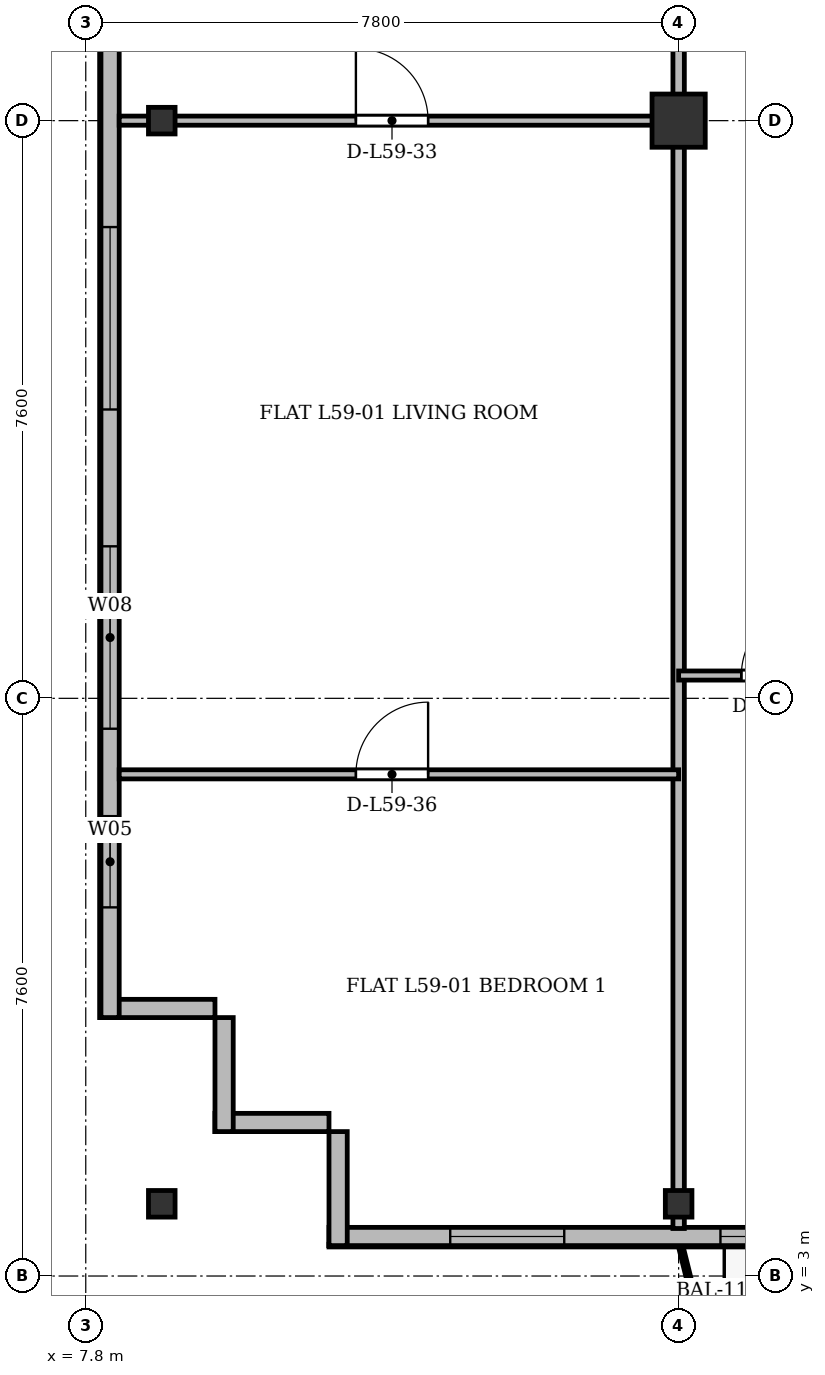
"""IFC4 building model, lengths in metres.
Left out: names, types, materials, properties, quantities, classifications, styles, units other than length and angle.
Written with IfcOpenShell. Run it as: python <this file> out.ifc"""

import sys

from ifc_helpers import new_model, si_unit, direction, frame, frame_2d, origin, origin_2d, place, context, subcontext, project, spatial, rectangle, i_section, extrude, source, transform, mapped, element, fill, save


model = new_model("IFC4")
c1 = context("Model", 3, precision=1e-05, world=origin(), true_north=direction((0.0, 1.0)))
c2 = subcontext(c1, "Body", "Model", "MODEL_VIEW")
j1 = project(units=[si_unit("LENGTHUNIT", "METRE"), si_unit("PLANEANGLEUNIT", "RADIAN")], contexts=[c1])
p1 = place(None, origin())
s1 = spatial("IfcSite", under=j1, at=p1, CompositionType="ELEMENT")
p2 = place(p1, origin())
s2 = spatial("IfcBuilding", under=s1, at=p2, CompositionType="ELEMENT")
p3 = place(p2, frame((0.0, 0.0, 226.5)))
s3 = spatial("IfcBuildingStorey", under=s2, at=p3, CompositionType="ELEMENT", Elevation=226.5)
m1 = source(origin(), c2, "Body", "SweptSolid", [
    extrude(i_section(OverallWidth=0.35, OverallDepth=0.35, WebThickness=0.018, FlangeThickness=0.028, at=origin_2d()), origin(), (0.0, 0.0, 1.0), 3.6),
])
for number, where, z_axis, x_axis in (
    (1, (8.8, 3.95, 0.0), (0.0, 0.0, 1.0), (1.0, 0.0, 0.0)),
    (2, (8.8, 18.2, 0.0), (0.0, 0.0, 1.0), (1.0, 0.0, 0.0)),
    (3, (15.6, 3.95, 0.0), (0.0, 0.0, 1.0), (1.0, 0.0, 0.0)),
):
    element("IfcColumn", number, at=place(p3, frame(where, z_axis=z_axis, x_axis=x_axis)), inside=s3, PredefinedType="COLUMN", context=c2, shape_type="MappedRepresentation", body=[
        mapped(m1, transform((0.0, 0.0, 0.0), x_axis=(1.0, 0.0, 0.0), y_axis=(0.0, 1.0, 0.0), z_axis=(0.0, 0.0, 1.0), scale=1.0)),
    ])
m2 = source(origin(), c2, "Body", "SweptSolid", [
    extrude(rectangle(XDim=0.7, YDim=0.7, at=origin_2d()), origin(), (0.0, 0.0, 1.0), 3.6),
])
p4 = place(p3, frame((15.6, 18.2, 0.0), z_axis=(0.0, 0.0, 1.0), x_axis=(1.0, 0.0, 0.0)))
e4 = element("IfcColumn", 4, at=p4, inside=s3, PredefinedType="COLUMN", context=c2, shape_type="MappedRepresentation", body=[
    mapped(m2, transform((0.0, 0.0, 0.0), x_axis=(1.0, 0.0, 0.0), y_axis=(0.0, 1.0, 0.0), z_axis=(0.0, 0.0, 1.0), scale=1.0)),
])
for number, where, z_axis, x_axis in (
    (5, (11.0, 5.02, 0.0), (0.0, 0.0, 1.0), (-1.0, 0.0, 0.0)),
    (6, (9.62, 4.9, 0.0), (0.0, 0.0, 1.0), (0.0, 1.0, 0.0)),
):
    element("IfcWall", number, at=place(p3, frame(where, z_axis=z_axis, x_axis=x_axis)), inside=s3, PredefinedType="SOLIDWALL", context=c2, shape_type="SweptSolid", body=[
        extrude(rectangle(XDim=1.5, YDim=0.24, at=frame_2d((0.75, 0.0))), origin(), (0.0, 0.0, 1.0), 3.36),
    ])
p5 = place(p3, frame((9.5, 6.52, 0.0), z_axis=(0.0, 0.0, 1.0), x_axis=(-1.0, 0.0, 0.0)))
e7 = element("IfcWall", 7, at=p5, inside=s3, PredefinedType="SOLIDWALL", context=c2, shape_type="SweptSolid", body=[
    extrude(rectangle(XDim=1.5, YDim=0.24, at=frame_2d((0.75, 0.0))), origin(), (0.0, 0.0, 1.0), 2.86),
])
p6 = place(p3, frame((8.12, 6.4, 0.0), z_axis=(0.0, 0.0, 1.0), x_axis=(0.0, 1.0, 0.0)))
e8 = element("IfcWall", 8, at=p6, inside=s3, PredefinedType="SOLIDWALL", context=c2, shape_type="SweptSolid", body=[
    extrude(rectangle(XDim=39.1, YDim=0.24, at=frame_2d((19.55, 0.0))), origin(), (0.0, 0.0, 1.0), 3.36),
])
p7 = place(p6, frame((1.45, 0.0, 0.92)))
e9 = element("IfcOpeningElement", 9, at=p7, cuts=e8, PredefinedType="OPENING", context=c2, shape_type="SweptSolid", body=[
    extrude(rectangle(XDim=1.2, YDim=1.65, at=frame_2d((0.6, 0.825))), frame((0.0, 0.13, 0.0), z_axis=(0.0, -1.0, 0.0), x_axis=(1.0, 0.0, 0.0)), (0.0, 0.0, 1.0), 0.26),
])
p8 = place(p6, frame((3.8, 0.0, 0.92)))
e10 = element("IfcOpeningElement", 10, at=p8, cuts=e8, PredefinedType="OPENING", context=c2, shape_type="SweptSolid", body=[
    extrude(rectangle(XDim=2.4, YDim=2.1, at=frame_2d((1.2, 1.05))), frame((0.0, 0.13, 0.0), z_axis=(0.0, -1.0, 0.0), x_axis=(1.0, 0.0, 0.0)), (0.0, 0.0, 1.0), 0.26),
])
p9 = place(p6, frame((8.0, 0.0, 0.92)))
e11 = element("IfcOpeningElement", 11, at=p9, cuts=e8, PredefinedType="OPENING", context=c2, shape_type="SweptSolid", body=[
    extrude(rectangle(XDim=2.4, YDim=2.1, at=frame_2d((1.2, 1.05))), frame((0.0, 0.13, 0.0), z_axis=(0.0, -1.0, 0.0), x_axis=(1.0, 0.0, 0.0)), (0.0, 0.0, 1.0), 0.26),
])
p10 = place(p6, frame((15.2, 0.0, 0.92)))
e12 = element("IfcOpeningElement", 12, at=p10, cuts=e8, PredefinedType="OPENING", context=c2, shape_type="SweptSolid", body=[
    extrude(rectangle(XDim=2.4, YDim=2.1, at=frame_2d((1.2, 1.05))), frame((0.0, 0.13, 0.0), z_axis=(0.0, -1.0, 0.0), x_axis=(1.0, 0.0, 0.0)), (0.0, 0.0, 1.0), 0.26),
])
p11 = place(p6, frame((33.4, 0.0, 0.92)))
e13 = element("IfcOpeningElement", 13, at=p11, cuts=e8, PredefinedType="OPENING", context=c2, shape_type="SweptSolid", body=[
    extrude(rectangle(XDim=1.2, YDim=1.65, at=frame_2d((0.6, 0.825))), frame((0.0, 0.13, 0.0), z_axis=(0.0, -1.0, 0.0), x_axis=(1.0, 0.0, 0.0)), (0.0, 0.0, 1.0), 0.26),
])
p12 = place(p6, frame((36.75, 0.0, 0.92)))
e14 = element("IfcOpeningElement", 14, at=p12, cuts=e8, PredefinedType="OPENING", context=c2, shape_type="SweptSolid", body=[
    extrude(rectangle(XDim=1.2, YDim=1.65, at=frame_2d((0.6, 0.825))), frame((0.0, 0.13, 0.0), z_axis=(0.0, -1.0, 0.0), x_axis=(1.0, 0.0, 0.0)), (0.0, 0.0, 1.0), 0.26),
])
p13 = place(p3, frame((63.4, 3.52, 0.0), z_axis=(0.0, 0.0, 1.0), x_axis=(-1.0, 0.0, 0.0)))
e15 = element("IfcWall", 15, at=p13, inside=s3, PredefinedType="SOLIDWALL", context=c2, shape_type="SweptSolid", body=[
    extrude(rectangle(XDim=52.4, YDim=0.24, at=frame_2d((26.2, 0.0))), origin(), (0.0, 0.0, 1.0), 3.36),
])
p14 = place(p13, frame((1.52, 0.0, 0.9)))
e16 = element("IfcOpeningElement", 16, at=p14, cuts=e15, PredefinedType="OPENING", context=c2, shape_type="SweptSolid", body=[
    extrude(rectangle(XDim=1.65, YDim=1.85, at=frame_2d((0.825, 0.925))), frame((0.0, 0.13, 0.0), z_axis=(0.0, -1.0, 0.0), x_axis=(1.0, 0.0, 0.0)), (0.0, 0.0, 1.0), 0.26),
])
p15 = place(p13, frame((7.6, 0.0, 0.9)))
e17 = element("IfcOpeningElement", 17, at=p15, cuts=e15, PredefinedType="OPENING", context=c2, shape_type="SweptSolid", body=[
    extrude(rectangle(XDim=1.8, YDim=1.8, at=frame_2d((0.9, 0.9))), frame((0.0, 0.13, 0.0), z_axis=(0.0, -1.0, 0.0), x_axis=(1.0, 0.0, 0.0)), (0.0, 0.0, 1.0), 0.26),
])
p16 = place(p13, frame((13.42, 0.0, 0.0)))
e18 = element("IfcOpeningElement", 18, at=p16, cuts=e15, PredefinedType="OPENING", context=c2, shape_type="SweptSolid", body=[
    extrude(rectangle(XDim=1.2, YDim=2.2, at=frame_2d((0.6, 1.1))), frame((0.0, 0.13, 0.0), z_axis=(0.0, -1.0, 0.0), x_axis=(1.0, 0.0, 0.0)), (0.0, 0.0, 1.0), 0.26),
])
p17 = place(p13, frame((15.25, 0.0, 0.9)))
e19 = element("IfcOpeningElement", 19, at=p17, cuts=e15, PredefinedType="OPENING", context=c2, shape_type="SweptSolid", body=[
    extrude(rectangle(XDim=1.5, YDim=1.75, at=frame_2d((0.75, 0.875))), frame((0.0, 0.13, 0.0), z_axis=(0.0, -1.0, 0.0), x_axis=(1.0, 0.0, 0.0)), (0.0, 0.0, 1.0), 0.26),
])
p18 = place(p13, frame((17.4, 0.0, 0.9)))
e20 = element("IfcOpeningElement", 20, at=p18, cuts=e15, PredefinedType="OPENING", context=c2, shape_type="SweptSolid", body=[
    extrude(rectangle(XDim=2.0, YDim=1.95, at=frame_2d((1.0, 0.975))), frame((0.0, 0.13, 0.0), z_axis=(0.0, -1.0, 0.0), x_axis=(1.0, 0.0, 0.0)), (0.0, 0.0, 1.0), 0.26),
])
p19 = place(p13, frame((20.425, 0.0, 0.9)))
e21 = element("IfcOpeningElement", 21, at=p19, cuts=e15, PredefinedType="OPENING", context=c2, shape_type="SweptSolid", body=[
    extrude(rectangle(XDim=1.65, YDim=1.85, at=frame_2d((0.825, 0.925))), frame((0.0, 0.13, 0.0), z_axis=(0.0, -1.0, 0.0), x_axis=(1.0, 0.0, 0.0)), (0.0, 0.0, 1.0), 0.26),
])
p20 = place(p13, frame((23.65, 0.0, 0.9)))
e22 = element("IfcOpeningElement", 22, at=p20, cuts=e15, PredefinedType="OPENING", context=c2, shape_type="SweptSolid", body=[
    extrude(rectangle(XDim=1.8, YDim=1.8, at=frame_2d((0.9, 0.9))), frame((0.0, 0.13, 0.0), z_axis=(0.0, -1.0, 0.0), x_axis=(1.0, 0.0, 0.0)), (0.0, 0.0, 1.0), 0.26),
])
p21 = place(p13, frame((28.4, 0.0, 0.9)))
e23 = element("IfcOpeningElement", 23, at=p21, cuts=e15, PredefinedType="OPENING", context=c2, shape_type="SweptSolid", body=[
    extrude(rectangle(XDim=2.2, YDim=1.8, at=frame_2d((1.1, 0.9))), frame((0.0, 0.13, 0.0), z_axis=(0.0, -1.0, 0.0), x_axis=(1.0, 0.0, 0.0)), (0.0, 0.0, 1.0), 0.26),
])
p22 = place(p13, frame((33.85, 0.0, 0.9)))
e24 = element("IfcOpeningElement", 24, at=p22, cuts=e15, PredefinedType="OPENING", context=c2, shape_type="SweptSolid", body=[
    extrude(rectangle(XDim=1.5, YDim=1.75, at=frame_2d((0.75, 0.875))), frame((0.0, 0.13, 0.0), z_axis=(0.0, -1.0, 0.0), x_axis=(1.0, 0.0, 0.0)), (0.0, 0.0, 1.0), 0.26),
])
p23 = place(p13, frame((37.2, 0.0, 0.9)))
e25 = element("IfcOpeningElement", 25, at=p23, cuts=e15, PredefinedType="OPENING", context=c2, shape_type="SweptSolid", body=[
    extrude(rectangle(XDim=2.0, YDim=1.95, at=frame_2d((1.0, 0.975))), frame((0.0, 0.13, 0.0), z_axis=(0.0, -1.0, 0.0), x_axis=(1.0, 0.0, 0.0)), (0.0, 0.0, 1.0), 0.26),
])
p24 = place(p13, frame((41.09, 0.0, 0.0)))
e26 = element("IfcOpeningElement", 26, at=p24, cuts=e15, PredefinedType="OPENING", context=c2, shape_type="SweptSolid", body=[
    extrude(rectangle(XDim=1.2, YDim=2.2, at=frame_2d((0.6, 1.1))), frame((0.0, 0.13, 0.0), z_axis=(0.0, -1.0, 0.0), x_axis=(1.0, 0.0, 0.0)), (0.0, 0.0, 1.0), 0.26),
])
p25 = place(p13, frame((43.0, 0.0, 0.9)))
e27 = element("IfcOpeningElement", 27, at=p25, cuts=e15, PredefinedType="OPENING", context=c2, shape_type="SweptSolid", body=[
    extrude(rectangle(XDim=1.8, YDim=1.8, at=frame_2d((0.9, 0.9))), frame((0.0, 0.13, 0.0), z_axis=(0.0, -1.0, 0.0), x_axis=(1.0, 0.0, 0.0)), (0.0, 0.0, 1.0), 0.26),
])
p26 = place(p13, frame((45.75, 0.0, 0.9)))
e28 = element("IfcOpeningElement", 28, at=p26, cuts=e15, PredefinedType="OPENING", context=c2, shape_type="SweptSolid", body=[
    extrude(rectangle(XDim=1.5, YDim=1.75, at=frame_2d((0.75, 0.875))), frame((0.0, 0.13, 0.0), z_axis=(0.0, -1.0, 0.0), x_axis=(1.0, 0.0, 0.0)), (0.0, 0.0, 1.0), 0.26),
])
p27 = place(p13, frame((49.305, 0.0, 0.9)))
e29 = element("IfcOpeningElement", 29, at=p27, cuts=e15, PredefinedType="OPENING", context=c2, shape_type="SweptSolid", body=[
    extrude(rectangle(XDim=1.5, YDim=1.75, at=frame_2d((0.75, 0.875))), frame((0.0, 0.13, 0.0), z_axis=(0.0, -1.0, 0.0), x_axis=(1.0, 0.0, 0.0)), (0.0, 0.0, 1.0), 0.26),
])
p28 = place(p3, frame((11.12, 3.4, 0.0), z_axis=(0.0, 0.0, 1.0), x_axis=(0.0, 1.0, 0.0)))
e30 = element("IfcWall", 30, at=p28, inside=s3, PredefinedType="SOLIDWALL", context=c2, shape_type="SweptSolid", body=[
    extrude(rectangle(XDim=1.5, YDim=0.24, at=frame_2d((0.75, 0.0))), origin(), (0.0, 0.0, 1.0), 2.91),
])
p29 = place(p3, frame((15.6, 3.625, 0.0), z_axis=(0.0, 0.0, 1.0), x_axis=(0.0, 1.0, 0.0)))
e31 = element("IfcWall", 31, at=p29, inside=s3, PredefinedType="PARTITIONING", context=c2, shape_type="SweptSolid", body=[
    extrude(rectangle(XDim=27.375, YDim=0.15, at=frame_2d((13.688, 0.0))), origin(), (0.0, 0.0, 1.0), 2.86),
])
p30 = place(p3, frame((8.24, 18.2, 0.0), z_axis=(0.0, 0.0, 1.0), x_axis=(1.0, 0.0, 0.0)))
e32 = element("IfcWall", 32, at=p30, inside=s3, PredefinedType="PARTITIONING", context=c2, shape_type="SweptSolid", body=[
    extrude(rectangle(XDim=7.36, YDim=0.12, at=frame_2d((3.68, 0.0))), origin(), (0.0, 0.0, 1.0), 2.91),
])
p31 = place(p30, frame((3.114, 0.0, 0.0)))
e33 = element("IfcOpeningElement", 33, at=p31, cuts=e32, PredefinedType="OPENING", context=c2, shape_type="SweptSolid", body=[
    extrude(rectangle(XDim=0.95, YDim=2.15, at=frame_2d((0.475, 1.075))), frame((0.0, 0.07, 0.0), z_axis=(0.0, -1.0, 0.0), x_axis=(1.0, 0.0, 0.0)), (0.0, 0.0, 1.0), 0.14),
])
p32 = place(p3, frame((8.24, 9.6, 0.0), z_axis=(0.0, 0.0, 1.0), x_axis=(1.0, 0.0, 0.0)))
e34 = element("IfcWall", 34, at=p32, inside=s3, PredefinedType="PARTITIONING", context=c2, shape_type="SweptSolid", body=[
    extrude(rectangle(XDim=7.36, YDim=0.12, at=frame_2d((3.68, 0.0))), origin(), (0.0, 0.0, 1.0), 2.86),
])
p33 = place(p32, frame((3.114, 0.0, 0.0)))
e35 = element("IfcOpeningElement", 35, at=p33, cuts=e34, PredefinedType="OPENING", context=c2, shape_type="SweptSolid", body=[
    extrude(rectangle(XDim=0.95, YDim=2.15, at=frame_2d((0.475, 1.075))), frame((0.0, 0.07, 0.0), z_axis=(0.0, -1.0, 0.0), x_axis=(1.0, 0.0, 0.0)), (0.0, 0.0, 1.0), 0.14),
])
p34 = place(p3, frame((15.6, 10.9, 0.0), z_axis=(0.0, 0.0, 1.0), x_axis=(1.0, 0.0, 0.0)))
e36 = element("IfcWall", 36, at=p34, inside=s3, PredefinedType="PARTITIONING", context=c2, shape_type="SweptSolid", body=[
    extrude(rectangle(XDim=2.6, YDim=0.12, at=frame_2d((1.3, 0.0))), origin(), (0.0, 0.0, 1.0), 2.86),
])
p35 = place(p34, frame((0.825, 0.0, 0.0)))
e37 = element("IfcOpeningElement", 37, at=p35, cuts=e36, PredefinedType="OPENING", context=c2, shape_type="SweptSolid", body=[
    extrude(rectangle(XDim=0.95, YDim=2.15, at=frame_2d((0.475, 1.075))), frame((0.0, 0.07, 0.0), z_axis=(0.0, -1.0, 0.0), x_axis=(1.0, 0.0, 0.0)), (0.0, 0.0, 1.0), 0.14),
])
m3 = source(origin(), c2, "Body", "SweptSolid", [
    extrude(rectangle(XDim=1.2, YDim=1.65, at=frame_2d((0.6, 0.825))), frame((0.0, 0.03, 0.0), z_axis=(0.0, -1.0, 0.0), x_axis=(1.0, 0.0, 0.0)), (0.0, 0.0, 1.0), 0.06),
])
p36 = place(p7, origin())
e38 = element("IfcWindow", 38, at=p36, inside=s3, PartitioningType="SINGLE_PANEL", PredefinedType="WINDOW", context=c2, shape_type="MappedRepresentation", body=[
    mapped(m3, transform((0.0, 0.0, 0.0), x_axis=(1.0, 0.0, 0.0), y_axis=(0.0, 1.0, 0.0), z_axis=(0.0, 0.0, 1.0), scale=1.0)),
])
fill(e9, e38)
m4 = source(origin(), c2, "Body", "SweptSolid", [
    extrude(rectangle(XDim=2.4, YDim=2.1, at=frame_2d((1.2, 1.05))), frame((0.0, 0.03, 0.0), z_axis=(0.0, -1.0, 0.0), x_axis=(1.0, 0.0, 0.0)), (0.0, 0.0, 1.0), 0.06),
])
p37 = place(p8, origin())
e39 = element("IfcWindow", 39, at=p37, inside=s3, PartitioningType="SINGLE_PANEL", PredefinedType="WINDOW", context=c2, shape_type="MappedRepresentation", body=[
    mapped(m4, transform((0.0, 0.0, 0.0), x_axis=(1.0, 0.0, 0.0), y_axis=(0.0, 1.0, 0.0), z_axis=(0.0, 0.0, 1.0), scale=1.0)),
])
fill(e10, e39)
p38 = place(p9, origin())
e40 = element("IfcWindow", 40, at=p38, inside=s3, PartitioningType="SINGLE_PANEL", PredefinedType="WINDOW", context=c2, shape_type="MappedRepresentation", body=[
    mapped(m4, transform((0.0, 0.0, 0.0), x_axis=(1.0, 0.0, 0.0), y_axis=(0.0, 1.0, 0.0), z_axis=(0.0, 0.0, 1.0), scale=1.0)),
])
fill(e11, e40)
m5 = source(origin(), c2, "Body", "SweptSolid", [
    extrude(rectangle(XDim=1.5, YDim=1.75, at=frame_2d((0.75, 0.875))), frame((0.0, 0.03, 0.0), z_axis=(0.0, -1.0, 0.0), x_axis=(1.0, 0.0, 0.0)), (0.0, 0.0, 1.0), 0.06),
])
p39 = place(p26, origin())
e41 = element("IfcWindow", 41, at=p39, inside=s3, PartitioningType="SINGLE_PANEL", PredefinedType="WINDOW", context=c2, shape_type="MappedRepresentation", body=[
    mapped(m5, transform((0.0, 0.0, 0.0), x_axis=(1.0, 0.0, 0.0), y_axis=(0.0, 1.0, 0.0), z_axis=(0.0, 0.0, 1.0), scale=1.0)),
])
fill(e28, e41)
p40 = place(p27, origin())
e42 = element("IfcWindow", 42, at=p40, inside=s3, PartitioningType="SINGLE_PANEL", PredefinedType="WINDOW", context=c2, shape_type="MappedRepresentation", body=[
    mapped(m5, transform((0.0, 0.0, 0.0), x_axis=(1.0, 0.0, 0.0), y_axis=(0.0, 1.0, 0.0), z_axis=(0.0, 0.0, 1.0), scale=1.0)),
])
fill(e29, e42)
m6 = source(origin(), c2, "Body", "SweptSolid", [
    extrude(rectangle(XDim=0.95, YDim=2.15, at=frame_2d((0.475, 1.075))), frame((0.0, 0.025, 0.0), z_axis=(0.0, -1.0, 0.0), x_axis=(1.0, 0.0, 0.0)), (0.0, 0.0, 1.0), 0.05),
])
p41 = place(p31, origin())
e43 = element("IfcDoor", 43, at=p41, inside=s3, OperationType="SINGLE_SWING_LEFT", PredefinedType="DOOR", context=c2, shape_type="MappedRepresentation", body=[
    mapped(m6, transform((0.0, 0.0, 0.0), x_axis=(1.0, 0.0, 0.0), y_axis=(0.0, 1.0, 0.0), z_axis=(0.0, 0.0, 1.0), scale=1.0)),
])
fill(e33, e43)
p42 = place(p33, origin())
e44 = element("IfcDoor", 44, at=p42, inside=s3, OperationType="SINGLE_SWING_RIGHT", PredefinedType="DOOR", context=c2, shape_type="MappedRepresentation", body=[
    mapped(m6, transform((0.0, 0.0, 0.0), x_axis=(1.0, 0.0, 0.0), y_axis=(0.0, 1.0, 0.0), z_axis=(0.0, 0.0, 1.0), scale=1.0)),
])
fill(e35, e44)
p43 = place(p35, origin())
e45 = element("IfcDoor", 45, at=p43, inside=s3, OperationType="SINGLE_SWING_RIGHT", PredefinedType="DOOR", context=c2, shape_type="MappedRepresentation", body=[
    mapped(m6, transform((0.0, 0.0, 0.0), x_axis=(1.0, 0.0, 0.0), y_axis=(0.0, 1.0, 0.0), z_axis=(0.0, 0.0, 1.0), scale=1.0)),
])
fill(e37, e45)
save(model, sys.argv[1])
